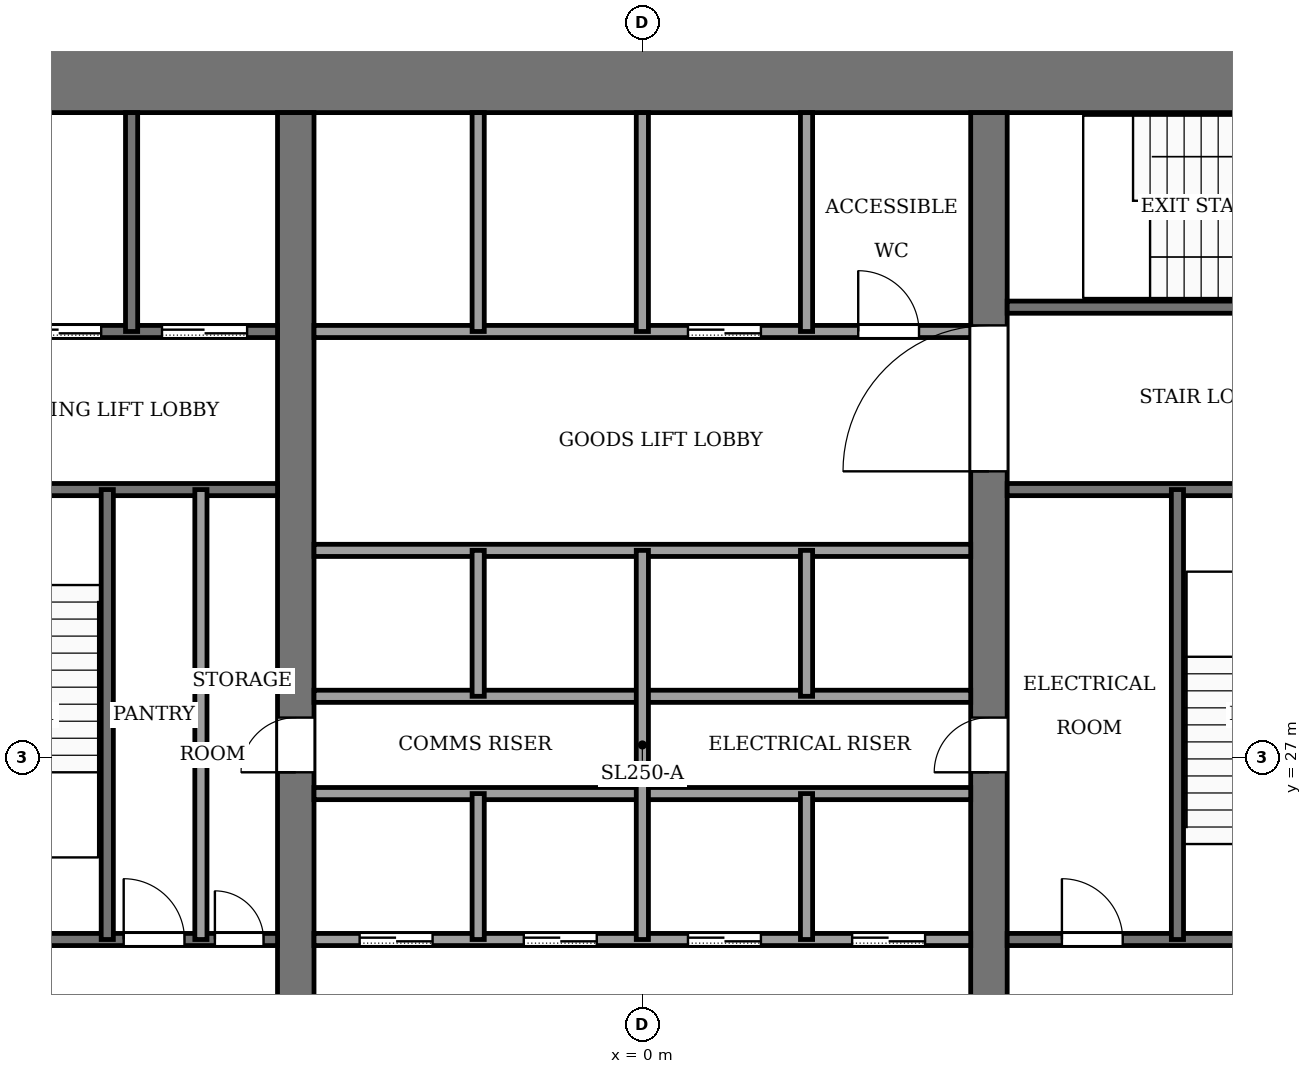
"""IFC4 building model, lengths in metres.
Left out: names, types, materials, properties, quantities, classifications, styles, units other than length and angle.
Written with IfcOpenShell. Run it as: python <this file> out.ifc"""

import sys

from ifc_helpers import new_model, si_unit, direction, frame, frame_2d, origin, place, context, subcontext, project, spatial, rectangle, extrude, element, fill, save


model = new_model("IFC4")
c1 = context("Model", 3, precision=1e-05, world=origin(), true_north=direction((0.0, 1.0)))
c2 = subcontext(c1, "Body", "Model", "MODEL_VIEW")
j1 = project(units=[si_unit("LENGTHUNIT", "METRE"), si_unit("PLANEANGLEUNIT", "RADIAN")], contexts=[c1])
p1 = place(None, origin())
s1 = spatial("IfcSite", under=j1, at=p1, CompositionType="ELEMENT")
p2 = place(p1, origin())
s2 = spatial("IfcBuilding", under=s1, at=p2, CompositionType="ELEMENT")
p3 = place(p2, frame((0.0, 0.0, 110.0)))
s3 = spatial("IfcBuildingStorey", under=s2, at=p3, CompositionType="ELEMENT", Elevation=110.0)
p4 = place(p3, frame((-13.8, 38.2, -0.13), z_axis=(0.0, 0.0, 1.0), x_axis=(1.0, 0.0, 0.0)))
e1 = element("IfcWall", 1, at=p4, inside=s3, PredefinedType="SHEAR", context=c2, shape_type="SweptSolid", body=[
    extrude(rectangle(XDim=27.6, YDim=1.2, at=frame_2d((13.8, 0.0))), origin(), (0.0, 0.0, 1.0), 3.88),
])
p5 = place(p3, frame((-5.7, 18.4, -0.13), z_axis=(0.0, 0.0, 1.0), x_axis=(0.0, 1.0, 0.0)))
e2 = element("IfcWall", 2, at=p5, inside=s3, PredefinedType="SHEAR", context=c2, shape_type="SweptSolid", body=[
    extrude(rectangle(XDim=19.2, YDim=0.6, at=frame_2d((9.6, 0.0))), origin(), (0.0, 0.0, 1.0), 3.88),
])
p6 = place(p5, frame((8.35, 0.0, 0.13)))
e3 = element("IfcOpeningElement", 3, at=p6, cuts=e2, PredefinedType="OPENING", context=c2, shape_type="SweptSolid", body=[
    extrude(rectangle(XDim=0.9, YDim=2.1, at=frame_2d((0.45, 1.05))), frame((0.0, 0.31, 0.0), z_axis=(0.0, -1.0, 0.0), x_axis=(1.0, 0.0, 0.0)), (0.0, 0.0, 1.0), 0.62),
])
p7 = place(p3, frame((5.7, 18.4, -0.13), z_axis=(0.0, 0.0, 1.0), x_axis=(0.0, 1.0, 0.0)))
e4 = element("IfcWall", 4, at=p7, inside=s3, PredefinedType="SHEAR", context=c2, shape_type="SweptSolid", body=[
    extrude(rectangle(XDim=19.2, YDim=0.6, at=frame_2d((9.6, 0.0))), origin(), (0.0, 0.0, 1.0), 3.88),
])
p8 = place(p7, frame((8.35, 0.0, 0.13)))
e5 = element("IfcOpeningElement", 5, at=p8, cuts=e4, PredefinedType="OPENING", context=c2, shape_type="SweptSolid", body=[
    extrude(rectangle(XDim=0.9, YDim=2.1, at=frame_2d((0.45, 1.05))), frame((0.0, 0.31, 0.0), z_axis=(0.0, -1.0, 0.0), x_axis=(1.0, 0.0, 0.0)), (0.0, 0.0, 1.0), 0.62),
])
p9 = place(p7, frame((13.3, 0.0, 0.13)))
e6 = element("IfcOpeningElement", 6, at=p9, cuts=e4, PredefinedType="OPENING", context=c2, shape_type="SweptSolid", body=[
    extrude(rectangle(XDim=2.4, YDim=2.4, at=frame_2d((1.2, 1.2))), frame((0.0, 0.31, 0.0), z_axis=(0.0, -1.0, 0.0), x_axis=(1.0, 0.0, 0.0)), (0.0, 0.0, 1.0), 0.62),
])
p10 = place(p3, frame((-12.6, 24.0, 0.0), z_axis=(0.0, 0.0, 1.0), x_axis=(1.0, 0.0, 0.0)))
e7 = element("IfcWall", 7, at=p10, inside=s3, PredefinedType="PARTITIONING", context=c2, shape_type="SweptSolid", body=[
    extrude(rectangle(XDim=6.6, YDim=0.2, at=frame_2d((3.3, 0.0))), origin(), (0.0, 0.0, 1.0), 3.75),
])
p11 = place(p10, frame((4.07, 0.0, 0.0)))
e8 = element("IfcOpeningElement", 8, at=p11, cuts=e7, PredefinedType="OPENING", context=c2, shape_type="SweptSolid", body=[
    extrude(rectangle(XDim=1.0, YDim=2.1, at=frame_2d((0.5, 1.05))), frame((0.0, 0.11, 0.0), z_axis=(0.0, -1.0, 0.0), x_axis=(1.0, 0.0, 0.0)), (0.0, 0.0, 1.0), 0.22),
])
p12 = place(p10, frame((5.57, 0.0, 0.0)))
e9 = element("IfcOpeningElement", 9, at=p12, cuts=e7, PredefinedType="OPENING", context=c2, shape_type="SweptSolid", body=[
    extrude(rectangle(XDim=0.8, YDim=2.1, at=frame_2d((0.4, 1.05))), frame((0.0, 0.11, 0.0), z_axis=(0.0, -1.0, 0.0), x_axis=(1.0, 0.0, 0.0)), (0.0, 0.0, 1.0), 0.22),
])
p13 = place(p3, frame((-5.4, 24.0, 0.0), z_axis=(0.0, 0.0, 1.0), x_axis=(1.0, 0.0, 0.0)))
e10 = element("IfcWall", 10, at=p13, inside=s3, PredefinedType="PARTITIONING", context=c2, shape_type="SweptSolid", body=[
    extrude(rectangle(XDim=10.8, YDim=0.2, at=frame_2d((5.4, 0.0))), origin(), (0.0, 0.0, 1.0), 3.75),
])
p14 = place(p13, frame((0.75, 0.0, 0.0)))
e11 = element("IfcOpeningElement", 11, at=p14, cuts=e10, PredefinedType="OPENING", context=c2, shape_type="SweptSolid", body=[
    extrude(rectangle(XDim=1.2, YDim=2.2, at=frame_2d((0.6, 1.1))), frame((0.0, 0.11, 0.0), z_axis=(0.0, -1.0, 0.0), x_axis=(1.0, 0.0, 0.0)), (0.0, 0.0, 1.0), 0.22),
])
p15 = place(p13, frame((3.45, 0.0, 0.0)))
e12 = element("IfcOpeningElement", 12, at=p15, cuts=e10, PredefinedType="OPENING", context=c2, shape_type="SweptSolid", body=[
    extrude(rectangle(XDim=1.2, YDim=2.2, at=frame_2d((0.6, 1.1))), frame((0.0, 0.11, 0.0), z_axis=(0.0, -1.0, 0.0), x_axis=(1.0, 0.0, 0.0)), (0.0, 0.0, 1.0), 0.22),
])
p16 = place(p13, frame((6.15, 0.0, 0.0)))
e13 = element("IfcOpeningElement", 13, at=p16, cuts=e10, PredefinedType="OPENING", context=c2, shape_type="SweptSolid", body=[
    extrude(rectangle(XDim=1.2, YDim=2.2, at=frame_2d((0.6, 1.1))), frame((0.0, 0.11, 0.0), z_axis=(0.0, -1.0, 0.0), x_axis=(1.0, 0.0, 0.0)), (0.0, 0.0, 1.0), 0.22),
])
p17 = place(p13, frame((8.85, 0.0, 0.0)))
e14 = element("IfcOpeningElement", 14, at=p17, cuts=e10, PredefinedType="OPENING", context=c2, shape_type="SweptSolid", body=[
    extrude(rectangle(XDim=1.2, YDim=2.2, at=frame_2d((0.6, 1.1))), frame((0.0, 0.11, 0.0), z_axis=(0.0, -1.0, 0.0), x_axis=(1.0, 0.0, 0.0)), (0.0, 0.0, 1.0), 0.22),
])
p18 = place(p3, frame((6.0, 24.0, 0.0), z_axis=(0.0, 0.0, 1.0), x_axis=(1.0, 0.0, 0.0)))
e15 = element("IfcWall", 15, at=p18, inside=s3, PredefinedType="PARTITIONING", context=c2, shape_type="SweptSolid", body=[
    extrude(rectangle(XDim=6.6, YDim=0.2, at=frame_2d((3.3, 0.0))), origin(), (0.0, 0.0, 1.0), 3.75),
])
p19 = place(p18, frame((0.9, 0.0, 0.0)))
e16 = element("IfcOpeningElement", 16, at=p19, cuts=e15, PredefinedType="OPENING", context=c2, shape_type="SweptSolid", body=[
    extrude(rectangle(XDim=1.0, YDim=2.1, at=frame_2d((0.5, 1.05))), frame((0.0, 0.11, 0.0), z_axis=(0.0, -1.0, 0.0), x_axis=(1.0, 0.0, 0.0)), (0.0, 0.0, 1.0), 0.22),
])
p20 = place(p18, frame((4.4, 0.0, 0.0)))
e17 = element("IfcOpeningElement", 17, at=p20, cuts=e15, PredefinedType="OPENING", context=c2, shape_type="SweptSolid", body=[
    extrude(rectangle(XDim=1.2, YDim=2.2, at=frame_2d((0.6, 1.1))), frame((0.0, 0.11, 0.0), z_axis=(0.0, -1.0, 0.0), x_axis=(1.0, 0.0, 0.0)), (0.0, 0.0, 1.0), 0.22),
])
for number, where, z_axis, x_axis in (
    (18, (-5.4, 26.4, 0.0), (0.0, 0.0, 1.0), (1.0, 0.0, 0.0)),
    (19, (-5.4, 28.0, 0.0), (0.0, 0.0, 1.0), (1.0, 0.0, 0.0)),
    (20, (-5.4, 30.4, 0.0), (0.0, 0.0, 1.0), (1.0, 0.0, 0.0)),
):
    element("IfcWall", number, at=place(p3, frame(where, z_axis=z_axis, x_axis=x_axis)), inside=s3, PredefinedType="PARTITIONING", context=c2, shape_type="SweptSolid", body=[
        extrude(rectangle(XDim=10.8, YDim=0.2, at=frame_2d((5.4, 0.0))), origin(), (0.0, 0.0, 1.0), 3.75),
    ])
p21 = place(p3, frame((-12.6, 31.4, 0.0), z_axis=(0.0, 0.0, 1.0), x_axis=(1.0, 0.0, 0.0)))
e21 = element("IfcWall", 21, at=p21, inside=s3, PredefinedType="PARTITIONING", context=c2, shape_type="SweptSolid", body=[
    extrude(rectangle(XDim=6.6, YDim=0.2, at=frame_2d((3.3, 0.0))), origin(), (0.0, 0.0, 1.0), 3.75),
])
p22 = place(p21, frame((1.0, 0.0, 0.0)))
e22 = element("IfcOpeningElement", 22, at=p22, cuts=e21, PredefinedType="OPENING", context=c2, shape_type="SweptSolid", body=[
    extrude(rectangle(XDim=1.2, YDim=2.2, at=frame_2d((0.6, 1.1))), frame((0.0, 0.11, 0.0), z_axis=(0.0, -1.0, 0.0), x_axis=(1.0, 0.0, 0.0)), (0.0, 0.0, 1.0), 0.22),
])
p23 = place(p3, frame((6.0, 31.4, 0.0), z_axis=(0.0, 0.0, 1.0), x_axis=(1.0, 0.0, 0.0)))
e23 = element("IfcWall", 23, at=p23, inside=s3, PredefinedType="PARTITIONING", context=c2, shape_type="SweptSolid", body=[
    extrude(rectangle(XDim=6.6, YDim=0.2, at=frame_2d((3.3, 0.0))), origin(), (0.0, 0.0, 1.0), 3.75),
])
p24 = place(p3, frame((-12.6, 34.0, 0.0), z_axis=(0.0, 0.0, 1.0), x_axis=(1.0, 0.0, 0.0)))
e24 = element("IfcWall", 24, at=p24, inside=s3, PredefinedType="PARTITIONING", context=c2, shape_type="SweptSolid", body=[
    extrude(rectangle(XDim=6.6, YDim=0.2, at=frame_2d((3.3, 0.0))), origin(), (0.0, 0.0, 1.0), 3.75),
])
p25 = place(p24, frame((4.7, 0.0, 0.0)))
e25 = element("IfcOpeningElement", 25, at=p25, cuts=e24, PredefinedType="OPENING", context=c2, shape_type="SweptSolid", body=[
    extrude(rectangle(XDim=1.4, YDim=2.2, at=frame_2d((0.7, 1.1))), frame((0.0, 0.11, 0.0), z_axis=(0.0, -1.0, 0.0), x_axis=(1.0, 0.0, 0.0)), (0.0, 0.0, 1.0), 0.22),
])
p26 = place(p24, frame((2.3, 0.0, 0.0)))
e26 = element("IfcOpeningElement", 26, at=p26, cuts=e24, PredefinedType="OPENING", context=c2, shape_type="SweptSolid", body=[
    extrude(rectangle(XDim=1.4, YDim=2.2, at=frame_2d((0.7, 1.1))), frame((0.0, 0.11, 0.0), z_axis=(0.0, -1.0, 0.0), x_axis=(1.0, 0.0, 0.0)), (0.0, 0.0, 1.0), 0.22),
])
p27 = place(p24, frame((0.45, 0.0, 0.0)))
e27 = element("IfcOpeningElement", 27, at=p27, cuts=e24, PredefinedType="OPENING", context=c2, shape_type="SweptSolid", body=[
    extrude(rectangle(XDim=0.9, YDim=2.1, at=frame_2d((0.45, 1.05))), frame((0.0, 0.11, 0.0), z_axis=(0.0, -1.0, 0.0), x_axis=(1.0, 0.0, 0.0)), (0.0, 0.0, 1.0), 0.22),
])
p28 = place(p3, frame((-5.4, 34.0, 0.0), z_axis=(0.0, 0.0, 1.0), x_axis=(1.0, 0.0, 0.0)))
e28 = element("IfcWall", 28, at=p28, inside=s3, PredefinedType="PARTITIONING", context=c2, shape_type="SweptSolid", body=[
    extrude(rectangle(XDim=10.8, YDim=0.2, at=frame_2d((5.4, 0.0))), origin(), (0.0, 0.0, 1.0), 3.75),
])
p29 = place(p28, frame((6.15, 0.0, 0.0)))
e29 = element("IfcOpeningElement", 29, at=p29, cuts=e28, PredefinedType="OPENING", context=c2, shape_type="SweptSolid", body=[
    extrude(rectangle(XDim=1.2, YDim=2.2, at=frame_2d((0.6, 1.1))), frame((0.0, 0.11, 0.0), z_axis=(0.0, -1.0, 0.0), x_axis=(1.0, 0.0, 0.0)), (0.0, 0.0, 1.0), 0.22),
])
p30 = place(p28, frame((8.95, 0.0, 0.0)))
e30 = element("IfcOpeningElement", 30, at=p30, cuts=e28, PredefinedType="OPENING", context=c2, shape_type="SweptSolid", body=[
    extrude(rectangle(XDim=1.0, YDim=2.1, at=frame_2d((0.5, 1.05))), frame((0.0, 0.11, 0.0), z_axis=(0.0, -1.0, 0.0), x_axis=(1.0, 0.0, 0.0)), (0.0, 0.0, 1.0), 0.22),
])
p31 = place(p3, frame((6.0, 34.4, 0.0), z_axis=(0.0, 0.0, 1.0), x_axis=(1.0, 0.0, 0.0)))
e31 = element("IfcWall", 31, at=p31, inside=s3, PredefinedType="PARTITIONING", context=c2, shape_type="SweptSolid", body=[
    extrude(rectangle(XDim=6.6, YDim=0.2, at=frame_2d((3.3, 0.0))), origin(), (0.0, 0.0, 1.0), 3.75),
])
p32 = place(p31, frame((4.8, 0.0, 0.0)))
e32 = element("IfcOpeningElement", 32, at=p32, cuts=e31, PredefinedType="OPENING", context=c2, shape_type="SweptSolid", body=[
    extrude(rectangle(XDim=1.2, YDim=2.2, at=frame_2d((0.6, 1.1))), frame((0.0, 0.11, 0.0), z_axis=(0.0, -1.0, 0.0), x_axis=(1.0, 0.0, 0.0)), (0.0, 0.0, 1.0), 0.22),
])
p33 = place(p3, frame((-8.8, 24.0, 0.0), z_axis=(0.0, 0.0, 1.0), x_axis=(0.0, 1.0, 0.0)))
e33 = element("IfcWall", 33, at=p33, inside=s3, PredefinedType="PARTITIONING", context=c2, shape_type="SweptSolid", body=[
    extrude(rectangle(XDim=7.4, YDim=0.2, at=frame_2d((3.7, 0.0))), origin(), (0.0, 0.0, 1.0), 3.75),
])
p34 = place(p3, frame((-8.4, 34.0, 0.0), z_axis=(0.0, 0.0, 1.0), x_axis=(0.0, 1.0, 0.0)))
e34 = element("IfcWall", 34, at=p34, inside=s3, PredefinedType="PARTITIONING", context=c2, shape_type="SweptSolid", body=[
    extrude(rectangle(XDim=3.6, YDim=0.2, at=frame_2d((1.8, 0.0))), origin(), (0.0, 0.0, 1.0), 3.75),
])
p35 = place(p3, frame((-7.26, 24.0, 0.0), z_axis=(0.0, 0.0, 1.0), x_axis=(0.0, 1.0, 0.0)))
e35 = element("IfcWall", 35, at=p35, inside=s3, PredefinedType="PARTITIONING", context=c2, shape_type="SweptSolid", body=[
    extrude(rectangle(XDim=7.4, YDim=0.2, at=frame_2d((3.7, 0.0))), origin(), (0.0, 0.0, 1.0), 3.75),
])
for number, where, z_axis, x_axis in (
    (36, (-2.7, 24.0, 0.0), (0.0, 0.0, 1.0), (0.0, 1.0, 0.0)),
    (37, (-2.7, 28.0, 0.0), (0.0, 0.0, 1.0), (0.0, 1.0, 0.0)),
):
    element("IfcWall", number, at=place(p3, frame(where, z_axis=z_axis, x_axis=x_axis)), inside=s3, PredefinedType="PARTITIONING", context=c2, shape_type="SweptSolid", body=[
        extrude(rectangle(XDim=2.4, YDim=0.2, at=frame_2d((1.2, 0.0))), origin(), (0.0, 0.0, 1.0), 3.75),
    ])
p36 = place(p3, frame((-2.7, 34.0, 0.0), z_axis=(0.0, 0.0, 1.0), x_axis=(0.0, 1.0, 0.0)))
e38 = element("IfcWall", 38, at=p36, inside=s3, PredefinedType="PARTITIONING", context=c2, shape_type="SweptSolid", body=[
    extrude(rectangle(XDim=3.6, YDim=0.2, at=frame_2d((1.8, 0.0))), origin(), (0.0, 0.0, 1.0), 3.75),
])
p37 = place(p3, frame((0.0, 24.0, 0.0), z_axis=(0.0, 0.0, 1.0), x_axis=(0.0, 1.0, 0.0)))
e39 = element("IfcWall", 39, at=p37, inside=s3, PredefinedType="PARTITIONING", context=c2, shape_type="SweptSolid", body=[
    extrude(rectangle(XDim=6.4, YDim=0.2, at=frame_2d((3.2, 0.0))), origin(), (0.0, 0.0, 1.0), 3.75),
])
p38 = place(p3, frame((0.0, 34.0, 0.0), z_axis=(0.0, 0.0, 1.0), x_axis=(0.0, 1.0, 0.0)))
e40 = element("IfcWall", 40, at=p38, inside=s3, PredefinedType="PARTITIONING", context=c2, shape_type="SweptSolid", body=[
    extrude(rectangle(XDim=3.6, YDim=0.2, at=frame_2d((1.8, 0.0))), origin(), (0.0, 0.0, 1.0), 3.75),
])
for number, where, z_axis, x_axis in (
    (41, (2.7, 24.0, 0.0), (0.0, 0.0, 1.0), (0.0, 1.0, 0.0)),
    (42, (2.7, 28.0, 0.0), (0.0, 0.0, 1.0), (0.0, 1.0, 0.0)),
):
    element("IfcWall", number, at=place(p3, frame(where, z_axis=z_axis, x_axis=x_axis)), inside=s3, PredefinedType="PARTITIONING", context=c2, shape_type="SweptSolid", body=[
        extrude(rectangle(XDim=2.4, YDim=0.2, at=frame_2d((1.2, 0.0))), origin(), (0.0, 0.0, 1.0), 3.75),
    ])
p39 = place(p3, frame((2.7, 34.0, 0.0), z_axis=(0.0, 0.0, 1.0), x_axis=(0.0, 1.0, 0.0)))
e43 = element("IfcWall", 43, at=p39, inside=s3, PredefinedType="PARTITIONING", context=c2, shape_type="SweptSolid", body=[
    extrude(rectangle(XDim=3.6, YDim=0.2, at=frame_2d((1.8, 0.0))), origin(), (0.0, 0.0, 1.0), 3.75),
])
p40 = place(p3, frame((8.8, 24.0, 0.0), z_axis=(0.0, 0.0, 1.0), x_axis=(0.0, 1.0, 0.0)))
e44 = element("IfcWall", 44, at=p40, inside=s3, PredefinedType="PARTITIONING", context=c2, shape_type="SweptSolid", body=[
    extrude(rectangle(XDim=7.4, YDim=0.2, at=frame_2d((3.7, 0.0))), origin(), (0.0, 0.0, 1.0), 3.75),
])
p41 = place(p14, origin())
e45 = element("IfcDoor", 45, at=p41, inside=s3, OperationType="SLIDING_TO_LEFT", PredefinedType="DOOR", context=c2, shape_type="SweptSolid", body=[
    extrude(rectangle(XDim=1.2, YDim=2.2, at=frame_2d((0.6, 1.1))), frame((0.0, 0.025, 0.0), z_axis=(0.0, -1.0, 0.0), x_axis=(1.0, 0.0, 0.0)), (0.0, 0.0, 1.0), 0.05),
])
fill(e11, e45)
p42 = place(p15, origin())
e46 = element("IfcDoor", 46, at=p42, inside=s3, OperationType="SLIDING_TO_LEFT", PredefinedType="DOOR", context=c2, shape_type="SweptSolid", body=[
    extrude(rectangle(XDim=1.2, YDim=2.2, at=frame_2d((0.6, 1.1))), frame((0.0, 0.025, 0.0), z_axis=(0.0, -1.0, 0.0), x_axis=(1.0, 0.0, 0.0)), (0.0, 0.0, 1.0), 0.05),
])
fill(e12, e46)
p43 = place(p16, origin())
e47 = element("IfcDoor", 47, at=p43, inside=s3, OperationType="SLIDING_TO_LEFT", PredefinedType="DOOR", context=c2, shape_type="SweptSolid", body=[
    extrude(rectangle(XDim=1.2, YDim=2.2, at=frame_2d((0.6, 1.1))), frame((0.0, 0.025, 0.0), z_axis=(0.0, -1.0, 0.0), x_axis=(1.0, 0.0, 0.0)), (0.0, 0.0, 1.0), 0.05),
])
fill(e13, e47)
p44 = place(p17, origin())
e48 = element("IfcDoor", 48, at=p44, inside=s3, OperationType="SLIDING_TO_LEFT", PredefinedType="DOOR", context=c2, shape_type="SweptSolid", body=[
    extrude(rectangle(XDim=1.2, YDim=2.2, at=frame_2d((0.6, 1.1))), frame((0.0, 0.025, 0.0), z_axis=(0.0, -1.0, 0.0), x_axis=(1.0, 0.0, 0.0)), (0.0, 0.0, 1.0), 0.05),
])
fill(e14, e48)
p45 = place(p29, origin())
e49 = element("IfcDoor", 49, at=p45, inside=s3, OperationType="SLIDING_TO_LEFT", PredefinedType="DOOR", context=c2, shape_type="SweptSolid", body=[
    extrude(rectangle(XDim=1.2, YDim=2.2, at=frame_2d((0.6, 1.1))), frame((0.0, 0.025, 0.0), z_axis=(0.0, -1.0, 0.0), x_axis=(1.0, 0.0, 0.0)), (0.0, 0.0, 1.0), 0.05),
])
fill(e29, e49)
p46 = place(p25, origin())
e50 = element("IfcDoor", 50, at=p46, inside=s3, OperationType="SLIDING_TO_LEFT", PredefinedType="DOOR", context=c2, shape_type="SweptSolid", body=[
    extrude(rectangle(XDim=1.4, YDim=2.2, at=frame_2d((0.7, 1.1))), frame((0.0, 0.025, 0.0), z_axis=(0.0, -1.0, 0.0), x_axis=(1.0, 0.0, 0.0)), (0.0, 0.0, 1.0), 0.05),
])
fill(e25, e50)
p47 = place(p26, origin())
e51 = element("IfcDoor", 51, at=p47, inside=s3, OperationType="SLIDING_TO_LEFT", PredefinedType="DOOR", context=c2, shape_type="SweptSolid", body=[
    extrude(rectangle(XDim=1.4, YDim=2.2, at=frame_2d((0.7, 1.1))), frame((0.0, 0.025, 0.0), z_axis=(0.0, -1.0, 0.0), x_axis=(1.0, 0.0, 0.0)), (0.0, 0.0, 1.0), 0.05),
])
fill(e26, e51)
p48 = place(p11, origin())
e52 = element("IfcDoor", 52, at=p48, inside=s3, OperationType="SINGLE_SWING_RIGHT", PredefinedType="DOOR", context=c2, shape_type="SweptSolid", body=[
    extrude(rectangle(XDim=1.0, YDim=2.1, at=frame_2d((0.5, 1.05))), frame((0.0, 0.025, 0.0), z_axis=(0.0, -1.0, 0.0), x_axis=(1.0, 0.0, 0.0)), (0.0, 0.0, 1.0), 0.05),
])
fill(e8, e52)
p49 = place(p12, origin())
e53 = element("IfcDoor", 53, at=p49, inside=s3, OperationType="SINGLE_SWING_LEFT", PredefinedType="DOOR", context=c2, shape_type="SweptSolid", body=[
    extrude(rectangle(XDim=0.8, YDim=2.1, at=frame_2d((0.4, 1.05))), frame((0.0, 0.025, 0.0), z_axis=(0.0, -1.0, 0.0), x_axis=(1.0, 0.0, 0.0)), (0.0, 0.0, 1.0), 0.05),
])
fill(e9, e53)
p50 = place(p19, origin())
e54 = element("IfcDoor", 54, at=p50, inside=s3, OperationType="SINGLE_SWING_RIGHT", PredefinedType="DOOR", context=c2, shape_type="SweptSolid", body=[
    extrude(rectangle(XDim=1.0, YDim=2.1, at=frame_2d((0.5, 1.05))), frame((0.0, 0.025, 0.0), z_axis=(0.0, -1.0, 0.0), x_axis=(1.0, 0.0, 0.0)), (0.0, 0.0, 1.0), 0.05),
])
fill(e16, e54)
p51 = place(p30, origin())
e55 = element("IfcDoor", 55, at=p51, inside=s3, OperationType="SINGLE_SWING_LEFT", PredefinedType="DOOR", context=c2, shape_type="SweptSolid", body=[
    extrude(rectangle(XDim=1.0, YDim=2.1, at=frame_2d((0.5, 1.05))), frame((0.0, 0.025, 0.0), z_axis=(0.0, -1.0, 0.0), x_axis=(1.0, 0.0, 0.0)), (0.0, 0.0, 1.0), 0.05),
])
fill(e30, e55)
p52 = place(p6, origin())
e56 = element("IfcDoor", 56, at=p52, inside=s3, OperationType="SINGLE_SWING_LEFT", PredefinedType="DOOR", context=c2, shape_type="SweptSolid", body=[
    extrude(rectangle(XDim=0.9, YDim=2.1, at=frame_2d((0.45, 1.05))), frame((0.0, 0.025, 0.0), z_axis=(0.0, -1.0, 0.0), x_axis=(1.0, 0.0, 0.0)), (0.0, 0.0, 1.0), 0.05),
])
fill(e3, e56)
p53 = place(p8, origin())
e57 = element("IfcDoor", 57, at=p53, inside=s3, OperationType="SINGLE_SWING_RIGHT", PredefinedType="DOOR", context=c2, shape_type="SweptSolid", body=[
    extrude(rectangle(XDim=0.9, YDim=2.1, at=frame_2d((0.45, 1.05))), frame((0.0, 0.025, 0.0), z_axis=(0.0, -1.0, 0.0), x_axis=(1.0, 0.0, 0.0)), (0.0, 0.0, 1.0), 0.05),
])
fill(e5, e57)
p54 = place(p9, origin())
e58 = element("IfcDoor", 58, at=p54, inside=s3, OperationType="DOUBLE_DOOR_SINGLE_SWING", PredefinedType="DOOR", context=c2, shape_type="SweptSolid", body=[
    extrude(rectangle(XDim=2.4, YDim=2.4, at=frame_2d((1.2, 1.2))), frame((0.0, 0.025, 0.0), z_axis=(0.0, -1.0, 0.0), x_axis=(1.0, 0.0, 0.0)), (0.0, 0.0, 1.0), 0.05),
])
fill(e6, e58)
save(model, sys.argv[1])
